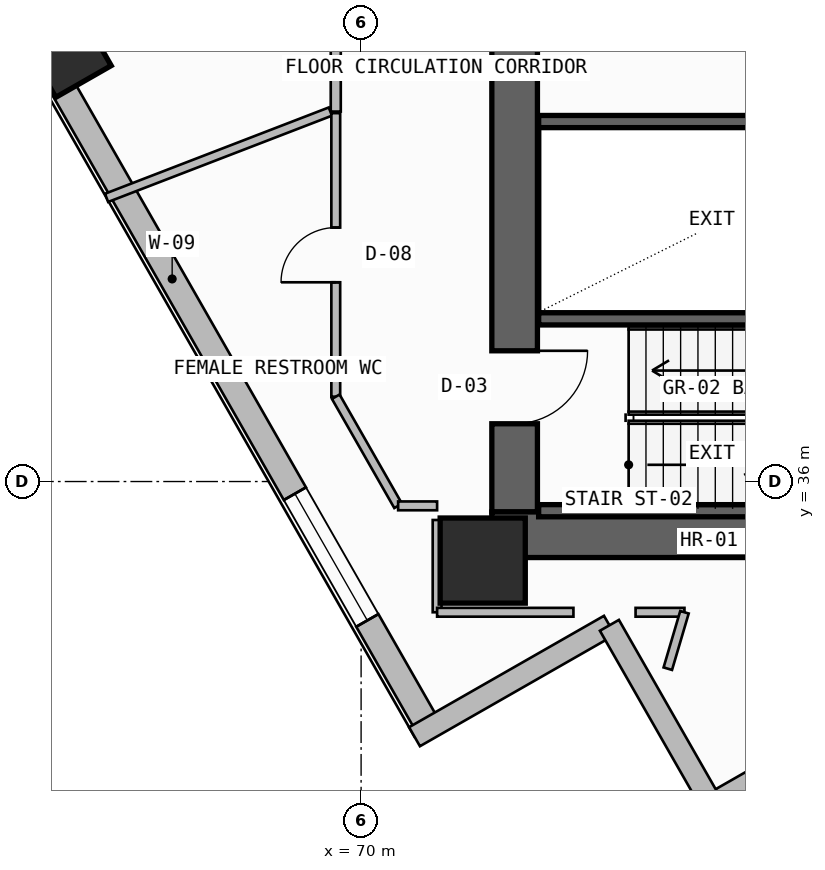
"""IFC4 building model, lengths in metres.
Left out: names, types, materials, properties, quantities, classifications, styles, units other than length and angle.
Written with IfcOpenShell. Run it as: python <this file> out.ifc"""

import sys

from ifc_helpers import new_model, si_unit, direction, frame, frame_2d, origin, origin_2d, place, context, subcontext, project, spatial, rectangle, extrude, element, fill, save


model = new_model("IFC4")
c1 = context("Model", 3, precision=1e-05, world=origin(), true_north=direction((0.0, 1.0)))
c2 = subcontext(c1, "Body", "Model", "MODEL_VIEW")
j1 = project(units=[si_unit("LENGTHUNIT", "METRE"), si_unit("PLANEANGLEUNIT", "RADIAN")], contexts=[c1])
p1 = place(None, origin())
s1 = spatial("IfcSite", under=j1, at=p1, CompositionType="ELEMENT")
p2 = place(p1, origin())
s2 = spatial("IfcBuilding", under=s1, at=p2, CompositionType="ELEMENT")
p3 = place(p2, frame((0.0, 0.0, 225.54)))
s3 = spatial("IfcBuildingStorey", under=s2, at=p3, CompositionType="ELEMENT", Elevation=225.54)
p4 = place(p3, frame((72.525, 35.5, -0.26), z_axis=(0.0, 0.0, 1.0), x_axis=(0.0, 1.0, 0.0)))
e1 = element("IfcWall", 1, at=p4, inside=s3, PredefinedType="SHEAR", context=c2, shape_type="SweptSolid", body=[
    extrude(rectangle(XDim=7.85, YDim=0.75, at=frame_2d((3.925, 0.0))), origin(), (0.0, 0.0, 1.0), 3.52),
])
p5 = place(p4, frame((1.45, 0.0, 0.26)))
e2 = element("IfcOpeningElement", 2, at=p5, cuts=e1, PredefinedType="OPENING", context=c2, shape_type="SweptSolid", body=[
    extrude(rectangle(XDim=1.2, YDim=2.2, at=frame_2d((0.6, 1.1))), frame((0.0, 0.385, 0.0), z_axis=(0.0, -1.0, 0.0), x_axis=(1.0, 0.0, 0.0)), (0.0, 0.0, 1.0), 0.77),
])
p6 = place(p3, frame((72.15, 35.125, -0.26), z_axis=(0.0, 0.0, 1.0), x_axis=(1.0, 0.0, 0.0)))
e3 = element("IfcWall", 3, at=p6, inside=s3, PredefinedType="SHEAR", context=c2, shape_type="SweptSolid", body=[
    extrude(rectangle(XDim=13.6, YDim=0.75, at=frame_2d((6.8, 0.0))), origin(), (0.0, 0.0, 1.0), 3.52),
])
p7 = place(p3, frame((72.0, 34.7, 0.0), z_axis=(0.0, 0.0, 1.0), x_axis=(1.0, 0.0, 0.0)))
e4 = element("IfcColumn", 4, at=p7, inside=s3, PredefinedType="COLUMN", context=c2, shape_type="SweptSolid", body=[
    extrude(rectangle(XDim=1.4, YDim=1.4, at=origin_2d()), origin(), (0.0, 0.0, 1.0), 3.52),
])
p8 = place(p3, frame((65.173, 43.035, 0.0), z_axis=(0.0, 0.0, 1.0), x_axis=(-0.496216503675, 0.868198814489, 0.0)))
e5 = element("IfcColumn", 5, at=p8, inside=s3, PredefinedType="COLUMN", context=c2, shape_type="SweptSolid", body=[
    extrude(rectangle(XDim=1.05, YDim=1.05, at=origin_2d()), origin(), (0.0, 0.0, 1.0), 3.52),
])
p9 = place(p3, frame((75.779, 30.669, 0.0), z_axis=(0.0, 0.0, 1.0), x_axis=(0.868213158215, 0.496191406519, 0.0)))
e6 = element("IfcWall", 6, at=p9, inside=s3, PredefinedType="SOLIDWALL", context=c2, shape_type="SweptSolid", body=[
    extrude(rectangle(XDim=7.015, YDim=0.42, at=frame_2d((3.508, 0.0))), origin(), (0.0, 0.0, 1.0), 3.26),
])
p10 = place(p9, frame((2.377, 0.0, 1.1)))
e7 = element("IfcOpeningElement", 7, at=p10, cuts=e6, PredefinedType="OPENING", context=c2, shape_type="SweptSolid", body=[
    extrude(rectangle(XDim=2.4, YDim=1.2, at=frame_2d((1.2, 0.6))), frame((0.0, 0.22, 0.0), z_axis=(0.0, -1.0, 0.0), x_axis=(1.0, 0.0, 0.0)), (0.0, 0.0, 1.0), 0.44),
])
p11 = place(p3, frame((55.325, 59.57, -0.26), z_axis=(0.0, 0.0, 1.0), x_axis=(0.496211351597, -0.868201759124, 0.0)))
e8 = element("IfcWall", 8, at=p11, inside=s3, PredefinedType="SHEAR", context=c2, shape_type="SweptSolid", body=[
    extrude(rectangle(XDim=19.243, YDim=0.55, at=frame_2d((9.622, 0.0))), origin(), (0.0, 0.0, 1.0), 3.52),
])
p12 = place(p11, frame((7.757, 0.0, 1.1)))
e9 = element("IfcOpeningElement", 9, at=p12, cuts=e8, PredefinedType="OPENING", context=c2, shape_type="SweptSolid", body=[
    extrude(rectangle(XDim=2.4, YDim=1.2, at=frame_2d((1.2, 0.6))), frame((0.0, 0.285, 0.0), z_axis=(0.0, -1.0, 0.0), x_axis=(1.0, 0.0, 0.0)), (0.0, 0.0, 1.0), 0.57),
])
p13 = place(p3, frame((64.874, 42.864, 0.0), z_axis=(0.0, 0.0, 1.0), x_axis=(0.49622043329, -0.868196568517, 0.0)))
e10 = element("IfcWall", 10, at=p13, inside=s3, PredefinedType="SOLIDWALL", context=c2, shape_type="SweptSolid", body=[
    extrude(rectangle(XDim=12.582, YDim=0.42, at=frame_2d((6.291, 0.0))), origin(), (0.0, 0.0, 1.0), 2.645),
])
p14 = place(p13, frame((8.136, 0.0, 1.1)))
e11 = element("IfcOpeningElement", 11, at=p14, cuts=e10, PredefinedType="OPENING", context=c2, shape_type="SweptSolid", body=[
    extrude(rectangle(XDim=2.4, YDim=1.2, at=frame_2d((1.2, 0.6))), frame((0.0, 0.22, 0.0), z_axis=(0.0, -1.0, 0.0), x_axis=(1.0, 0.0, 0.0)), (0.0, 0.0, 1.0), 0.44),
])
for number, where, z_axis, x_axis in (
    (12, (70.878, 31.803, 0.0), (0.0, 0.0, 1.0), (0.868, 0.496, 0.0)),
    (13, (74.084, 33.635, 0.0), (0.0, 0.0, 1.0), (0.496, -0.868, 0.0)),
):
    element("IfcWall", number, at=place(p3, frame(where, z_axis=z_axis, x_axis=x_axis)), inside=s3, PredefinedType="SOLIDWALL", context=c2, shape_type="SweptSolid", body=[
        extrude(rectangle(XDim=3.692, YDim=0.36, at=frame_2d((1.846, 0.0))), origin(), (0.0, 0.0, 1.0), 3.26),
    ])
for number, where, z_axis, x_axis in (
    (14, (72.92, 35.52, -0.26), (0.0, 0.0, 1.0), (1.0, 0.0, 0.0)),
    (15, (72.92, 38.675, -0.26), (0.0, 0.0, 1.0), (1.0, 0.0, 0.0)),
):
    element("IfcWall", number, at=place(p3, frame(where, z_axis=z_axis, x_axis=x_axis)), inside=s3, PredefinedType="SOLIDWALL", context=c2, shape_type="SweptSolid", body=[
        extrude(rectangle(XDim=7.7, YDim=0.2, at=frame_2d((3.85, 0.0))), origin(), (0.0, 0.0, 1.0), 3.52),
    ])
p15 = place(p3, frame((72.92, 41.92, -0.26), z_axis=(0.0, 0.0, 1.0), x_axis=(1.0, 0.0, 0.0)))
e16 = element("IfcWall", 16, at=p15, inside=s3, PredefinedType="SOLIDWALL", context=c2, shape_type="SweptSolid", body=[
    extrude(rectangle(XDim=7.58, YDim=0.2, at=frame_2d((3.79, 0.0))), origin(), (0.0, 0.0, 1.0), 3.52),
])
p16 = place(p3, frame((69.583, 47.656, 0.0), z_axis=(0.0, 0.0, 1.0), x_axis=(0.0, -1.0, 0.0)))
e17 = element("IfcWall", 17, at=p16, inside=s3, PredefinedType="PARTITIONING", context=c2, shape_type="SweptSolid", body=[
    extrude(rectangle(XDim=5.572, YDim=0.165, at=frame_2d((2.786, 0.0))), origin(), (0.0, 0.0, 1.0), 3.26),
])
p17 = place(p16, frame((2.286, 0.0, 0.0)))
e18 = element("IfcOpeningElement", 18, at=p17, cuts=e17, PredefinedType="OPENING", context=c2, shape_type="SweptSolid", body=[
    extrude(rectangle(XDim=1.0, YDim=2.2, at=frame_2d((0.5, 1.1))), frame((0.0, 0.093, 0.0), z_axis=(0.0, -1.0, 0.0), x_axis=(1.0, 0.0, 0.0)), (0.0, 0.0, 1.0), 0.185),
])
p18 = place(p3, frame((69.494, 42.084, 0.0), z_axis=(0.0, 0.0, 1.0), x_axis=(-0.933093355894, -0.359634243623, 0.0)))
e19 = element("IfcWall", 19, at=p18, inside=s3, PredefinedType="PARTITIONING", context=c2, shape_type="SweptSolid", body=[
    extrude(rectangle(XDim=3.945, YDim=0.145, at=frame_2d((1.972, 0.0))), origin(), (0.0, 0.0, 1.0), 3.26),
])
p19 = place(p3, frame((69.583, 42.058, 0.0), z_axis=(0.0, 0.0, 1.0), x_axis=(0.0, -1.0, 0.0)))
e20 = element("IfcWall", 20, at=p19, inside=s3, PredefinedType="PARTITIONING", context=c2, shape_type="SweptSolid", body=[
    extrude(rectangle(XDim=4.663, YDim=0.145, at=frame_2d((2.332, 0.0))), origin(), (0.0, 0.0, 1.0), 3.26),
])
p20 = place(p19, frame((1.882, 0.0, 0.0)))
e21 = element("IfcOpeningElement", 21, at=p20, cuts=e20, PredefinedType="OPENING", context=c2, shape_type="SweptSolid", body=[
    extrude(rectangle(XDim=0.9, YDim=2.1, at=frame_2d((0.45, 1.05))), frame((0.0, 0.083, 0.0), z_axis=(0.0, -1.0, 0.0), x_axis=(1.0, 0.0, 0.0)), (0.0, 0.0, 1.0), 0.165),
])
p21 = place(p3, frame((69.583, 37.395, 0.0), z_axis=(0.0, 0.0, 1.0), x_axis=(0.496215240912, -0.868199536217, 0.0)))
e22 = element("IfcWall", 22, at=p21, inside=s3, PredefinedType="PARTITIONING", context=c2, shape_type="SweptSolid", body=[
    extrude(rectangle(XDim=2.067, YDim=0.145, at=frame_2d((1.034, 0.0))), origin(), (0.0, 0.0, 1.0), 3.26),
])
p22 = place(p3, frame((70.609, 35.6, 0.0), z_axis=(0.0, 0.0, 1.0), x_axis=(1.0, 0.0, 0.0)))
e23 = element("IfcWall", 23, at=p22, inside=s3, PredefinedType="PARTITIONING", context=c2, shape_type="SweptSolid", body=[
    extrude(rectangle(XDim=0.641, YDim=0.145, at=frame_2d((0.32, 0.0))), origin(), (0.0, 0.0, 1.0), 3.26),
])
p23 = place(p3, frame((71.25, 35.367, 0.0), z_axis=(0.0, 0.0, 1.0), x_axis=(0.0, -1.0, 0.0)))
e24 = element("IfcWall", 24, at=p23, inside=s3, PredefinedType="PARTITIONING", context=c2, shape_type="SweptSolid", body=[
    extrude(rectangle(XDim=1.517, YDim=0.145, at=frame_2d((0.759, 0.0))), origin(), (0.0, 0.0, 1.0), 3.26),
])
p24 = place(p3, frame((71.25, 33.85, 0.0), z_axis=(0.0, 0.0, 1.0), x_axis=(1.0, 0.0, 0.0)))
e25 = element("IfcWall", 25, at=p24, inside=s3, PredefinedType="PARTITIONING", context=c2, shape_type="SweptSolid", body=[
    extrude(rectangle(XDim=2.242, YDim=0.145, at=frame_2d((1.121, 0.0))), origin(), (0.0, 0.0, 1.0), 3.26),
])
p25 = place(p3, frame((74.514, 33.85, 0.0), z_axis=(0.0, 0.0, 1.0), x_axis=(1.0, 0.0, 0.0)))
e26 = element("IfcWall", 26, at=p25, inside=s3, PredefinedType="PARTITIONING", context=c2, shape_type="SweptSolid", body=[
    extrude(rectangle(XDim=0.804, YDim=0.145, at=frame_2d((0.402, 0.0))), origin(), (0.0, 0.0, 1.0), 3.26),
])
p26 = place(p3, frame((75.318, 33.85, 0.0), z_axis=(0.0, 0.0, 1.0), x_axis=(-0.283177319633, -0.959067570949, 0.0)))
e27 = element("IfcWall", 27, at=p26, inside=s3, PredefinedType="PARTITIONING", context=c2, shape_type="SweptSolid", body=[
    extrude(rectangle(XDim=0.967, YDim=0.145, at=frame_2d((0.484, 0.0))), origin(), (0.0, 0.0, 1.0), 3.26),
])
p27 = place(p14, origin())
e28 = element("IfcWindow", 28, at=p27, inside=s3, PartitioningType="SINGLE_PANEL", PredefinedType="WINDOW", context=c2, shape_type="SweptSolid", body=[
    extrude(rectangle(XDim=2.4, YDim=1.2, at=frame_2d((1.2, 0.6))), frame((0.0, 0.03, 0.0), z_axis=(0.0, -1.0, 0.0), x_axis=(1.0, 0.0, 0.0)), (0.0, 0.0, 1.0), 0.06),
])
fill(e11, e28)
p28 = place(p5, frame((1.2, 0.0, 0.0), z_axis=(0.0, 0.0, 1.0), x_axis=(-1.0, 0.0, 0.0)))
e29 = element("IfcDoor", 29, at=p28, inside=s3, OperationType="SINGLE_SWING_LEFT", PredefinedType="USERDEFINED", context=c2, shape_type="SweptSolid", body=[
    extrude(rectangle(XDim=1.2, YDim=2.2, at=frame_2d((0.6, 1.1))), frame((0.0, 0.025, 0.0), z_axis=(0.0, -1.0, 0.0), x_axis=(1.0, 0.0, 0.0)), (0.0, 0.0, 1.0), 0.05),
])
fill(e2, e29)
p29 = place(p20, frame((0.9, 0.0, 0.0), z_axis=(0.0, 0.0, 1.0), x_axis=(-1.0, 0.0, 0.0)))
e30 = element("IfcDoor", 30, at=p29, inside=s3, OperationType="SINGLE_SWING_LEFT", PredefinedType="DOOR", context=c2, shape_type="SweptSolid", body=[
    extrude(rectangle(XDim=0.9, YDim=2.1, at=frame_2d((0.45, 1.05))), frame((0.0, 0.025, 0.0), z_axis=(0.0, -1.0, 0.0), x_axis=(1.0, 0.0, 0.0)), (0.0, 0.0, 1.0), 0.05),
])
fill(e21, e30)
save(model, sys.argv[1])
